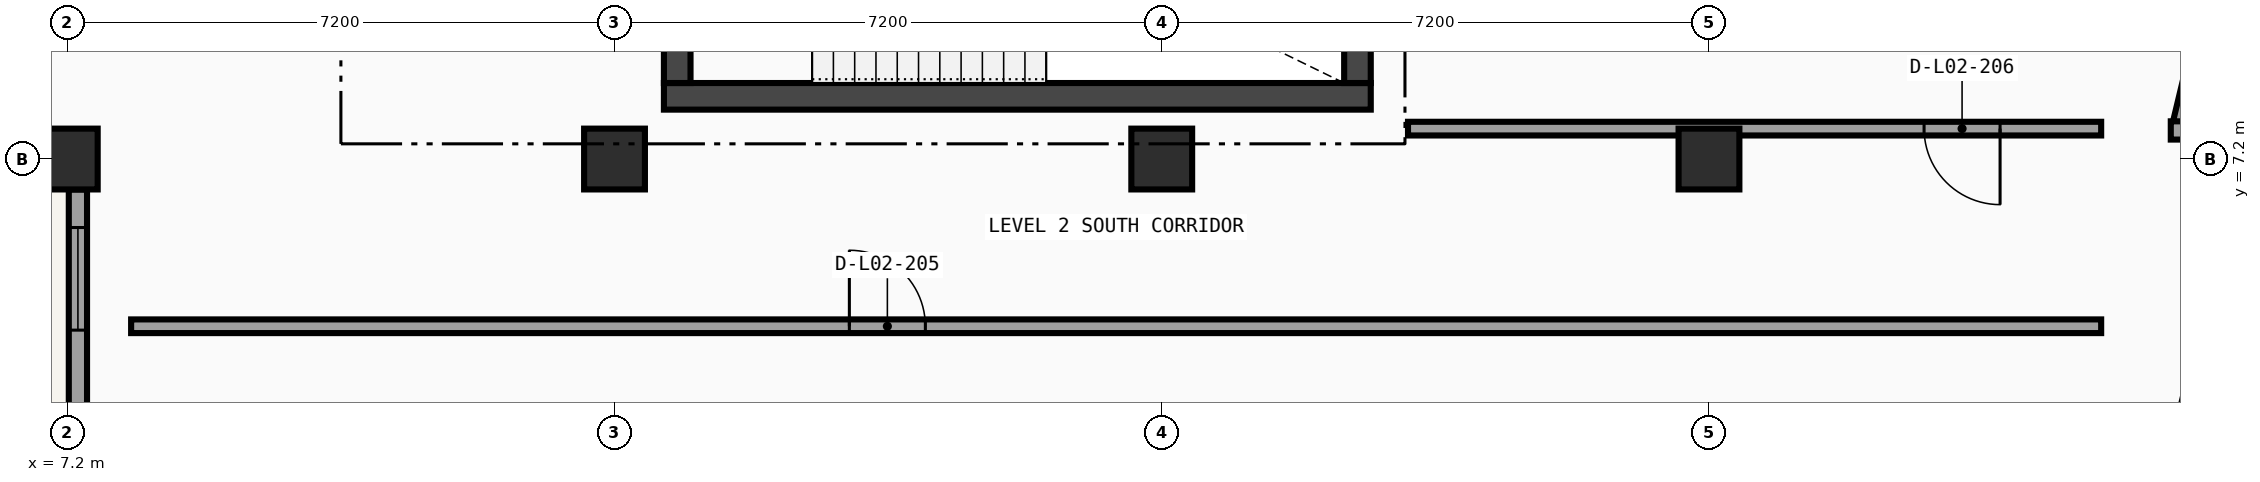
"""IFC4 building model, lengths in metres.
Left out: names, types, materials, properties, quantities, classifications, styles, units other than length and angle.
Written with IfcOpenShell. Run it as: python <this file> out.ifc"""

import sys

from ifc_helpers import new_model, si_unit, direction, frame, frame_2d, origin, origin_2d, place, context, subcontext, project, spatial, rectangle, extrude, element, fill, save


model = new_model("IFC4")
c1 = context("Model", 3, precision=1e-05, world=origin(), true_north=direction((0.0, 1.0)))
c2 = subcontext(c1, "Body", "Model", "MODEL_VIEW")
j1 = project(units=[si_unit("LENGTHUNIT", "METRE"), si_unit("PLANEANGLEUNIT", "RADIAN")], contexts=[c1])
p1 = place(None, origin())
s1 = spatial("IfcSite", under=j1, at=p1, CompositionType="ELEMENT")
p2 = place(p1, origin())
s2 = spatial("IfcBuilding", under=s1, at=p2, CompositionType="ELEMENT")
p3 = place(p2, frame((0.0, 0.0, 10.2)))
s3 = spatial("IfcBuildingStorey", under=s2, at=p3, CompositionType="ELEMENT", Elevation=10.2)
for number, where, z_axis, x_axis in (
    (1, (7.2, 7.2, 0.0), (0.0, 0.0, 1.0), (1.0, 0.0, 0.0)),
    (2, (14.4, 7.2, 0.0), (0.0, 0.0, 1.0), (1.0, 0.0, 0.0)),
    (3, (21.6, 7.2, 0.0), (0.0, 0.0, 1.0), (1.0, 0.0, 0.0)),
    (4, (28.8, 7.2, 0.0), (0.0, 0.0, 1.0), (1.0, 0.0, 0.0)),
):
    element("IfcColumn", number, at=place(p3, frame(where, z_axis=z_axis, x_axis=x_axis)), inside=s3, PredefinedType="COLUMN", context=c2, shape_type="SweptSolid", body=[
        extrude(rectangle(XDim=0.8, YDim=0.8, at=origin_2d()), origin(), (0.0, 0.0, 1.0), 4.5),
    ])
p4 = place(p3, frame((35.84, 10.988, 0.0), z_axis=(0.0, 0.0, 1.0), x_axis=(-0.23342163795, -0.972375616178, 0.0)))
e5 = element("IfcWall", 5, at=p4, inside=s3, PredefinedType="SOLIDWALL", context=c2, shape_type="SweptSolid", body=[
    extrude(rectangle(XDim=3.414, YDim=0.28, at=frame_2d((1.707, 0.0))), origin(), (0.0, 0.0, 1.0), 4.24),
])
p5 = place(p4, frame((0.932, 0.0, 0.8)))
e6 = element("IfcOpeningElement", 6, at=p5, cuts=e5, PredefinedType="OPENING", context=c2, shape_type="SweptSolid", body=[
    extrude(rectangle(XDim=1.55, YDim=1.8, at=frame_2d((0.775, 0.9))), frame((0.0, 0.15, 0.0), z_axis=(0.0, -1.0, 0.0), x_axis=(1.0, 0.0, 0.0)), (0.0, 0.0, 1.0), 0.3),
])
p6 = place(p3, frame((34.876, 7.576, 0.0), z_axis=(0.0, 0.0, 1.0), x_axis=(1.0, 0.0, 0.0)))
e7 = element("IfcWall", 7, at=p6, inside=s3, PredefinedType="SOLIDWALL", context=c2, shape_type="SweptSolid", body=[
    extrude(rectangle(XDim=0.832, YDim=0.24, at=frame_2d((0.416, 0.0))), origin(), (0.0, 0.0, 1.0), 4.24),
])
p7 = place(p3, frame((35.84, 6.824, 0.0), z_axis=(0.0, 0.0, 1.0), x_axis=(-0.233451302002, -0.972368494756, 0.0)))
e8 = element("IfcWall", 8, at=p7, inside=s3, PredefinedType="SOLIDWALL", context=c2, shape_type="SweptSolid", body=[
    extrude(rectangle(XDim=3.064, YDim=0.28, at=frame_2d((1.532, 0.0))), origin(), (0.0, 0.0, 1.0), 3.696),
])
p8 = place(p7, frame((0.757, 0.0, 0.8)))
e9 = element("IfcOpeningElement", 9, at=p8, cuts=e8, PredefinedType="OPENING", context=c2, shape_type="SweptSolid", body=[
    extrude(rectangle(XDim=1.55, YDim=1.8, at=frame_2d((0.775, 0.9))), frame((0.0, 0.15, 0.0), z_axis=(0.0, -1.0, 0.0), x_axis=(1.0, 0.0, 0.0)), (0.0, 0.0, 1.0), 0.3),
])
p9 = place(p3, frame((7.34, 0.401, 0.0), z_axis=(0.0, 0.0, 1.0), x_axis=(0.0, 1.0, 0.0)))
e10 = element("IfcWall", 10, at=p9, inside=s3, PredefinedType="SOLIDWALL", context=c2, shape_type="SweptSolid", body=[
    extrude(rectangle(XDim=6.398, YDim=0.24, at=frame_2d((3.199, 0.0))), origin(), (0.0, 0.0, 1.0), 3.696),
])
p10 = place(p9, frame((0.55, 0.0, 0.0)))
e11 = element("IfcOpeningElement", 11, at=p10, cuts=e10, PredefinedType="OPENING", context=c2, shape_type="SweptSolid", body=[
    extrude(rectangle(XDim=1.8, YDim=2.15, at=frame_2d((0.9, 1.075))), frame((0.0, 0.13, 0.0), z_axis=(0.0, -1.0, 0.0), x_axis=(1.0, 0.0, 0.0)), (0.0, 0.0, 1.0), 0.26),
])
p11 = place(p9, frame((4.548, 0.0, 0.85)))
e12 = element("IfcOpeningElement", 12, at=p11, cuts=e10, PredefinedType="OPENING", context=c2, shape_type="SweptSolid", body=[
    extrude(rectangle(XDim=1.35, YDim=1.85, at=frame_2d((0.675, 0.925))), frame((0.0, 0.13, 0.0), z_axis=(0.0, -1.0, 0.0), x_axis=(1.0, 0.0, 0.0)), (0.0, 0.0, 1.0), 0.26),
])
p12 = place(p3, frame((15.05, 8.025, 0.0), z_axis=(0.0, 0.0, 1.0), x_axis=(1.0, 0.0, 0.0)))
e13 = element("IfcWall", 13, at=p12, inside=s3, PredefinedType="SHEAR", context=c2, shape_type="SweptSolid", body=[
    extrude(rectangle(XDim=9.3, YDim=0.35, at=frame_2d((4.65, 0.0))), origin(), (0.0, 0.0, 1.0), 4.24),
])
p13 = place(p3, frame((15.225, 11.6, 0.0), z_axis=(0.0, 0.0, 1.0), x_axis=(0.0, -1.0, 0.0)))
e14 = element("IfcWall", 14, at=p13, inside=s3, PredefinedType="SHEAR", context=c2, shape_type="SweptSolid", body=[
    extrude(rectangle(XDim=3.4, YDim=0.35, at=frame_2d((1.7, 0.0))), origin(), (0.0, 0.0, 1.0), 4.24),
])
p14 = place(p13, frame((1.125, 0.0, 0.0)))
e15 = element("IfcOpeningElement", 15, at=p14, cuts=e14, PredefinedType="OPENING", context=c2, shape_type="SweptSolid", body=[
    extrude(rectangle(XDim=1.15, YDim=2.1, at=frame_2d((0.575, 1.05))), frame((0.0, 0.185, 0.0), z_axis=(0.0, -1.0, 0.0), x_axis=(1.0, 0.0, 0.0)), (0.0, 0.0, 1.0), 0.37),
])
p15 = place(p3, frame((24.175, 8.2, 0.0), z_axis=(0.0, 0.0, 1.0), x_axis=(0.0, 1.0, 0.0)))
e16 = element("IfcWall", 16, at=p15, inside=s3, PredefinedType="SHEAR", context=c2, shape_type="SweptSolid", body=[
    extrude(rectangle(XDim=3.4, YDim=0.35, at=frame_2d((1.7, 0.0))), origin(), (0.0, 0.0, 1.0), 4.24),
])
p16 = place(p3, frame((8.04, 5.0, 0.0), z_axis=(0.0, 0.0, 1.0), x_axis=(1.0, 0.0, 0.0)))
e17 = element("IfcWall", 17, at=p16, inside=s3, PredefinedType="PARTITIONING", context=c2, shape_type="SweptSolid", body=[
    extrude(rectangle(XDim=25.92, YDim=0.18, at=frame_2d((12.96, 0.0))), origin(), (0.0, 0.0, 1.0), 3.451),
])
p17 = place(p16, frame((9.45, 0.0, 0.0)))
e18 = element("IfcOpeningElement", 18, at=p17, cuts=e17, PredefinedType="OPENING", context=c2, shape_type="SweptSolid", body=[
    extrude(rectangle(XDim=1.0, YDim=2.1, at=frame_2d((0.5, 1.05))), frame((0.0, 0.1, 0.0), z_axis=(0.0, -1.0, 0.0), x_axis=(1.0, 0.0, 0.0)), (0.0, 0.0, 1.0), 0.2),
])
p18 = place(p3, frame((24.84, 7.6, 0.0), z_axis=(0.0, 0.0, 1.0), x_axis=(1.0, 0.0, 0.0)))
e19 = element("IfcWall", 19, at=p18, inside=s3, PredefinedType="PARTITIONING", context=c2, shape_type="SweptSolid", body=[
    extrude(rectangle(XDim=9.12, YDim=0.18, at=frame_2d((4.56, 0.0))), origin(), (0.0, 0.0, 1.0), 3.451),
])
p19 = place(p18, frame((6.79, 0.0, 0.0)))
e20 = element("IfcOpeningElement", 20, at=p19, cuts=e19, PredefinedType="OPENING", context=c2, shape_type="SweptSolid", body=[
    extrude(rectangle(XDim=1.0, YDim=2.1, at=frame_2d((0.5, 1.05))), frame((0.0, 0.1, 0.0), z_axis=(0.0, -1.0, 0.0), x_axis=(1.0, 0.0, 0.0)), (0.0, 0.0, 1.0), 0.2),
])
p20 = place(p11, origin())
e21 = element("IfcWindow", 21, at=p20, inside=s3, PartitioningType="SINGLE_PANEL", PredefinedType="WINDOW", context=c2, shape_type="SweptSolid", body=[
    extrude(rectangle(XDim=1.35, YDim=1.85, at=frame_2d((0.675, 0.925))), frame((0.0, 0.03, 0.0), z_axis=(0.0, -1.0, 0.0), x_axis=(1.0, 0.0, 0.0)), (0.0, 0.0, 1.0), 0.06),
])
fill(e12, e21)
p21 = place(p17, origin())
e22 = element("IfcDoor", 22, at=p21, inside=s3, OperationType="SINGLE_SWING_LEFT", PredefinedType="DOOR", context=c2, shape_type="SweptSolid", body=[
    extrude(rectangle(XDim=1.0, YDim=2.1, at=frame_2d((0.5, 1.05))), frame((0.0, 0.025, 0.0), z_axis=(0.0, -1.0, 0.0), x_axis=(1.0, 0.0, 0.0)), (0.0, 0.0, 1.0), 0.05),
])
fill(e18, e22)
p22 = place(p19, origin())
e23 = element("IfcDoor", 23, at=p22, inside=s3, OperationType="SINGLE_SWING_RIGHT", PredefinedType="DOOR", context=c2, shape_type="SweptSolid", body=[
    extrude(rectangle(XDim=1.0, YDim=2.1, at=frame_2d((0.5, 1.05))), frame((0.0, 0.025, 0.0), z_axis=(0.0, -1.0, 0.0), x_axis=(1.0, 0.0, 0.0)), (0.0, 0.0, 1.0), 0.05),
])
fill(e20, e23)
save(model, sys.argv[1])
